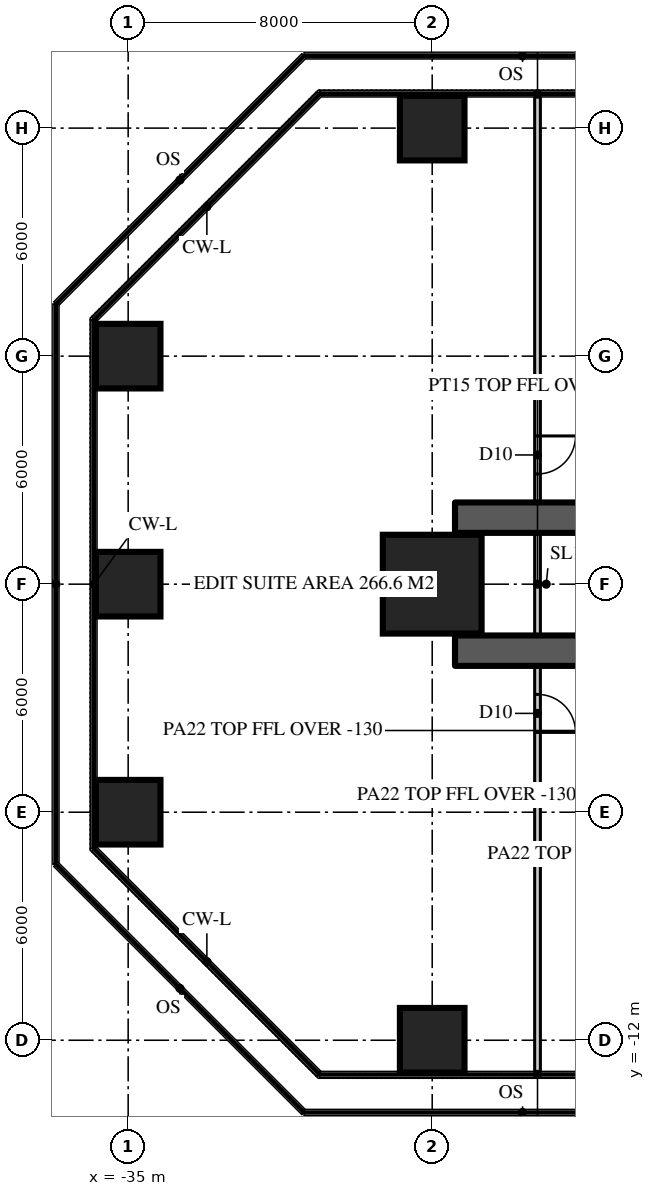
"""IFC4 building model, lengths in metres.
Left out: names, types, materials, properties, quantities, classifications, styles, units other than length and angle.
Written with IfcOpenShell. Run it as: python <this file> out.ifc"""

import sys

from ifc_helpers import new_model, si_unit, direction, frame, frame_2d, origin, origin_2d, place, context, subcontext, project, spatial, rectangle, extrude, element, fill, save


model = new_model("IFC4")
c1 = context("Model", 3, precision=1e-05, world=origin(), true_north=direction((0.0, 1.0)))
c2 = subcontext(c1, "Body", "Model", "MODEL_VIEW")
j1 = project(units=[si_unit("LENGTHUNIT", "METRE"), si_unit("PLANEANGLEUNIT", "RADIAN")], contexts=[c1])
p1 = place(None, origin())
s1 = spatial("IfcSite", under=j1, at=p1, CompositionType="ELEMENT")
p2 = place(p1, origin())
s2 = spatial("IfcBuilding", under=s1, at=p2, CompositionType="ELEMENT")
p3 = place(p2, frame((0.0, 0.0, 43.5)))
s3 = spatial("IfcBuildingStorey", under=s2, at=p3, CompositionType="ELEMENT", Elevation=43.5)
for number, where, z_axis, x_axis in (
    (1, (-11.15, 1.75, 0.0), (0.0, 0.0, 1.0), (-1.0, 0.0, 0.0)),
    (2, (-11.15, -1.75, 0.0), (0.0, 0.0, 1.0), (-1.0, 0.0, 0.0)),
):
    element("IfcWall", number, at=place(p3, frame(where, z_axis=z_axis, x_axis=x_axis)), inside=s3, PredefinedType="SHEAR", context=c2, shape_type="SweptSolid", body=[
        extrude(rectangle(XDim=15.25, YDim=0.8, at=frame_2d((7.625, 0.0))), origin(), (0.0, 0.0, 1.0), 3.9),
    ])
for number, where, z_axis, x_axis in (
    (3, (-27.0, -12.0, 0.0), (0.0, 0.0, 1.0), (1.0, 0.0, 0.0)),
    (4, (-35.0, -6.0, 0.0), (0.0, 0.0, 1.0), (1.0, 0.0, 0.0)),
    (5, (-35.0, 0.0, 0.0), (0.0, 0.0, 1.0), (1.0, 0.0, 0.0)),
):
    element("IfcColumn", number, at=place(p3, frame(where, z_axis=z_axis, x_axis=x_axis)), inside=s3, PredefinedType="COLUMN", context=c2, shape_type="SweptSolid", body=[
        extrude(rectangle(XDim=1.7, YDim=1.7, at=origin_2d()), origin(), (0.0, 0.0, 1.0), 3.9),
    ])
p4 = place(p3, frame((-27.0, 0.0, 0.0), z_axis=(0.0, 0.0, 1.0), x_axis=(1.0, 0.0, 0.0)))
e6 = element("IfcColumn", 6, at=p4, inside=s3, PredefinedType="COLUMN", context=c2, shape_type="SweptSolid", body=[
    extrude(rectangle(XDim=2.6, YDim=2.6, at=origin_2d()), origin(), (0.0, 0.0, 1.0), 3.9),
])
for number, where, z_axis, x_axis in (
    (7, (-35.0, 6.0, 0.0), (0.0, 0.0, 1.0), (1.0, 0.0, 0.0)),
    (8, (-27.0, 12.0, 0.0), (0.0, 0.0, 1.0), (1.0, 0.0, 0.0)),
):
    element("IfcColumn", number, at=place(p3, frame(where, z_axis=z_axis, x_axis=x_axis)), inside=s3, PredefinedType="COLUMN", context=c2, shape_type="SweptSolid", body=[
        extrude(rectangle(XDim=1.7, YDim=1.7, at=origin_2d()), origin(), (0.0, 0.0, 1.0), 3.9),
    ])
p5 = place(p3, frame((-24.229, 12.82, 0.0), z_axis=(0.0, 0.0, 1.0), x_axis=(0.0, -1.0, 0.0)))
e9 = element("IfcWall", 9, at=p5, inside=s3, PredefinedType="PARTITIONING", context=c2, shape_type="SweptSolid", body=[
    extrude(rectangle(XDim=25.64, YDim=0.15, at=frame_2d((12.82, 0.0))), origin(), (0.0, 0.0, 1.0), 3.77),
])
p6 = place(p5, frame((15.72, 0.0, 0.0)))
e10 = element("IfcOpeningElement", 10, at=p6, cuts=e9, PredefinedType="OPENING", context=c2, shape_type="SweptSolid", body=[
    extrude(rectangle(XDim=1.0, YDim=2.2, at=frame_2d((0.5, 1.1))), frame((0.0, 0.085, 0.0), z_axis=(0.0, -1.0, 0.0), x_axis=(1.0, 0.0, 0.0)), (0.0, 0.0, 1.0), 0.17),
])
p7 = place(p5, frame((8.92, 0.0, 0.0)))
e11 = element("IfcOpeningElement", 11, at=p7, cuts=e9, PredefinedType="OPENING", context=c2, shape_type="SweptSolid", body=[
    extrude(rectangle(XDim=1.0, YDim=2.2, at=frame_2d((0.5, 1.1))), frame((0.0, 0.085, 0.0), z_axis=(0.0, -1.0, 0.0), x_axis=(1.0, 0.0, 0.0)), (0.0, 0.0, 1.0), 0.17),
])
p8 = place(p6, origin())
e12 = element("IfcDoor", 12, at=p8, inside=s3, OperationType="SINGLE_SWING_RIGHT", PredefinedType="DOOR", context=c2, shape_type="SweptSolid", body=[
    extrude(rectangle(XDim=1.0, YDim=2.2, at=frame_2d((0.5, 1.1))), frame((0.0, 0.025, 0.0), z_axis=(0.0, -1.0, 0.0), x_axis=(1.0, 0.0, 0.0)), (0.0, 0.0, 1.0), 0.05),
])
fill(e10, e12)
p9 = place(p7, origin())
e13 = element("IfcDoor", 13, at=p9, inside=s3, OperationType="SINGLE_SWING_LEFT", PredefinedType="DOOR", context=c2, shape_type="SweptSolid", body=[
    extrude(rectangle(XDim=1.0, YDim=2.2, at=frame_2d((0.5, 1.1))), frame((0.0, 0.025, 0.0), z_axis=(0.0, -1.0, 0.0), x_axis=(1.0, 0.0, 0.0)), (0.0, 0.0, 1.0), 0.05),
])
fill(e11, e13)
save(model, sys.argv[1])
